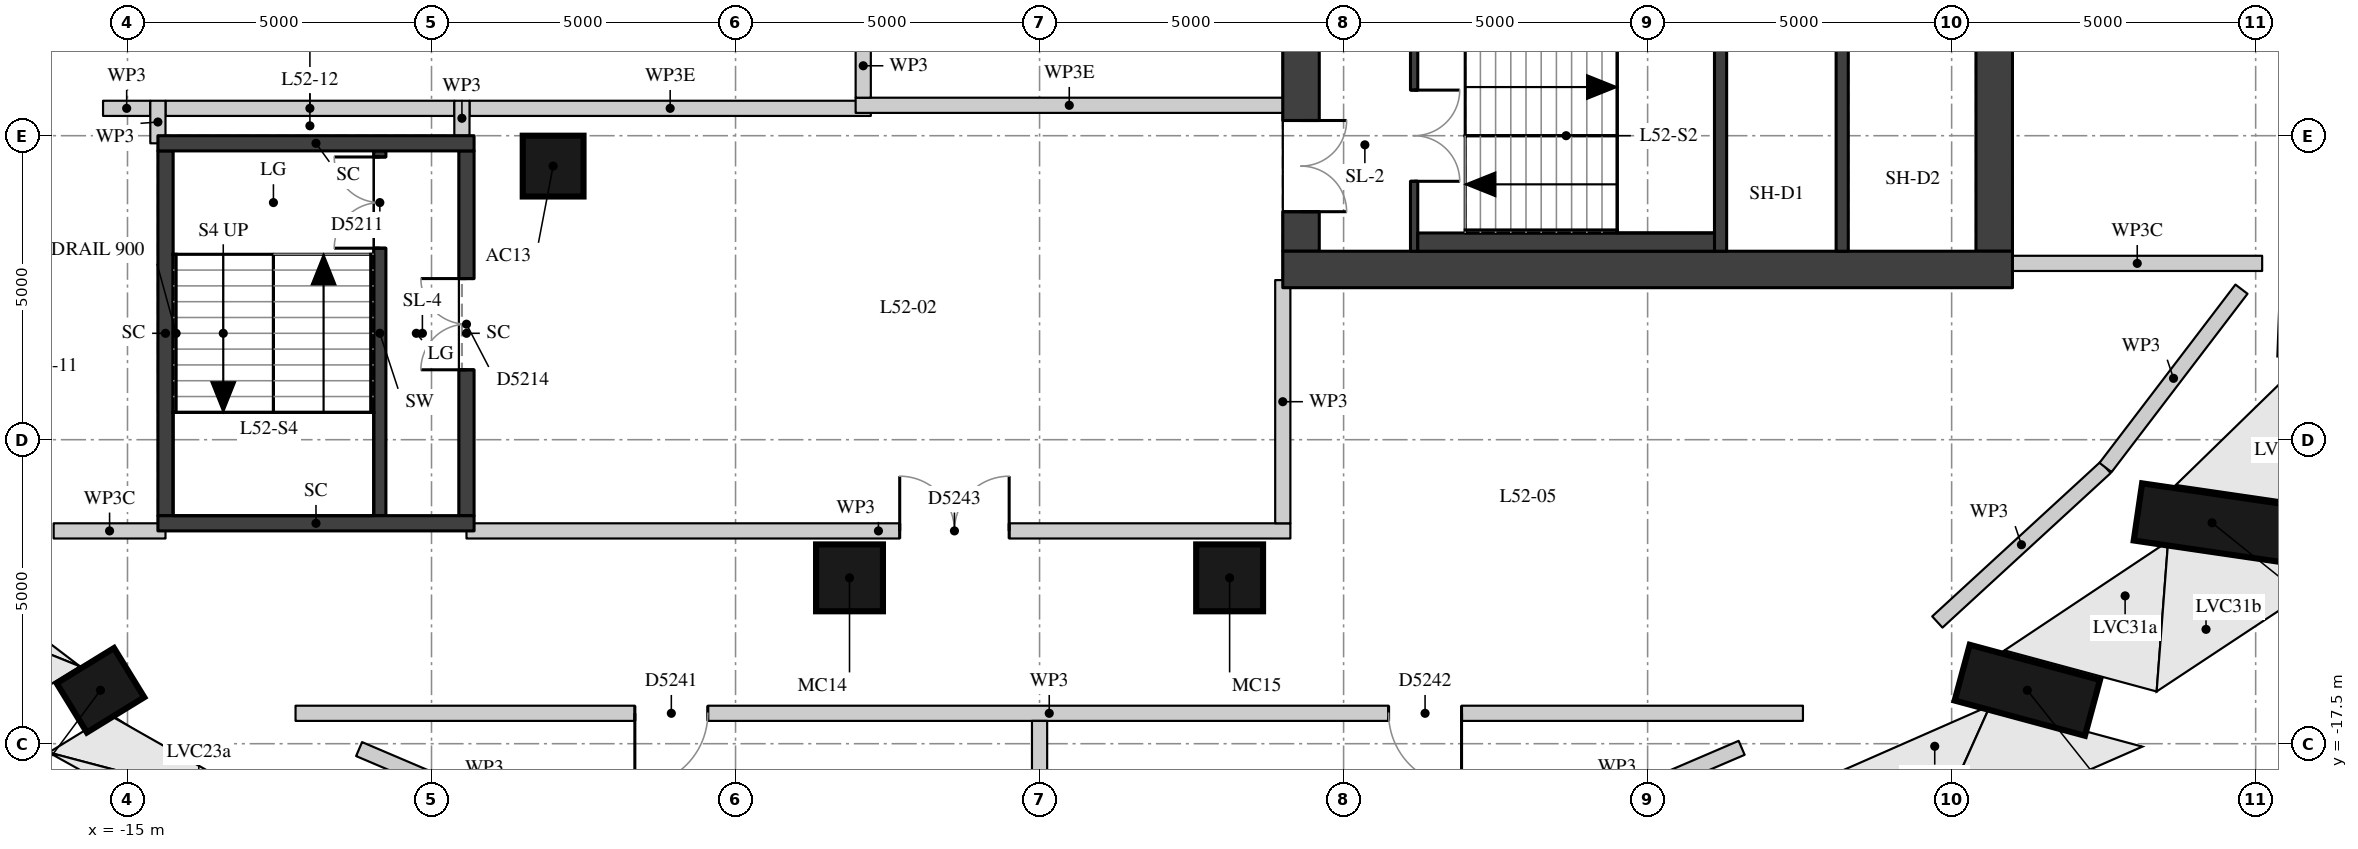
"""IFC4 building model, lengths in metres.
Left out: names, types, materials, properties, quantities, classifications, styles, units other than length and angle.
Written with IfcOpenShell. Run it as: python <this file> out.ifc"""

import sys

from ifc_helpers import new_model, si_unit, direction, frame, frame_2d, origin, origin_2d, place, context, subcontext, project, spatial, rectangle, extrude, element, fill, save


model = new_model("IFC4")
c1 = context("Model", 3, precision=1e-05, world=origin(), true_north=direction((0.0, 1.0)))
c2 = subcontext(c1, "Body", "Model", "MODEL_VIEW")
j1 = project(units=[si_unit("LENGTHUNIT", "METRE"), si_unit("PLANEANGLEUNIT", "RADIAN")], contexts=[c1])
p1 = place(None, origin())
s1 = spatial("IfcSite", under=j1, at=p1, CompositionType="ELEMENT")
p2 = place(p1, origin())
s2 = spatial("IfcBuilding", under=s1, at=p2, CompositionType="ELEMENT")
p3 = place(p2, frame((0.0, 0.0, 184.7)))
s3 = spatial("IfcBuildingStorey", under=s2, at=p3, CompositionType="ELEMENT", Elevation=184.7)
p4 = place(p3, frame((-14.973, -16.332, 0.195), z_axis=(-0.221461411378, -0.136054511212, 0.965631406516), x_axis=(0.822768251203, 0.505466535056, 0.259915345355)))
e1 = element("IfcColumn", 1, at=p4, inside=s3, PredefinedType="COLUMN", context=c2, shape_type="SweptSolid", body=[
    extrude(rectangle(XDim=1.5, YDim=0.95, at=origin_2d()), origin(), (0.0, 0.0, 1.0), 4.256),
])
p5 = place(p3, frame((-11.625, -18.476, 0.17), z_axis=(-0.140500038504, -0.177654239085, 0.974011658306), x_axis=(0.604194068875, 0.763968741279, 0.226497879647)))
e2 = element("IfcColumn", 2, at=p5, inside=s3, PredefinedType="COLUMN", context=c2, shape_type="SweptSolid", body=[
    extrude(rectangle(XDim=1.5, YDim=0.95, at=origin_2d()), origin(), (0.0, 0.0, 1.0), 4.271),
])
p6 = place(p3, frame((11.825, -18.476, 0.342), z_axis=(0.419835312824, -0.17697655666, 0.890178413858), x_axis=(-0.820277441268, 0.345778148306, 0.455612106403)))
e3 = element("IfcColumn", 3, at=p6, inside=s3, PredefinedType="COLUMN", context=c2, shape_type="SweptSolid", body=[
    extrude(rectangle(XDim=1.5, YDim=0.95, at=origin_2d()), origin(), (0.0, 0.0, 1.0), 4.288),
])
p7 = place(p3, frame((15.173, -16.332, 0.383), z_axis=(0.493348917889, -0.133328430356, 0.859552427067), x_axis=(-0.829784308789, 0.224250698467, 0.511047576184)))
e4 = element("IfcColumn", 4, at=p7, inside=s3, PredefinedType="COLUMN", context=c2, shape_type="SweptSolid", body=[
    extrude(rectangle(XDim=1.5, YDim=0.95, at=origin_2d()), origin(), (0.0, 0.0, 1.0), 4.344),
])
p8 = place(p3, frame((18.064, -13.688, 0.419), z_axis=(0.552371010599, -0.080908969614, 0.829662585203), x_axis=(-0.820903020973, 0.120242402852, 0.558265165234)))
e5 = element("IfcColumn", 5, at=p8, inside=s3, PredefinedType="COLUMN", context=c2, shape_type="SweptSolid", body=[
    extrude(rectangle(XDim=1.5, YDim=0.95, at=origin_2d()), origin(), (0.0, 0.0, 1.0), 4.415),
])
p9 = place(p3, frame((20.408, -10.625, 0.448), z_axis=(0.596244983469, -0.022282421222, 0.802493248191), x_axis=(-0.801933449266, 0.029969256604, 0.596661199181)))
e6 = element("IfcColumn", 6, at=p9, inside=s3, PredefinedType="COLUMN", context=c2, shape_type="SweptSolid", body=[
    extrude(rectangle(XDim=1.5, YDim=0.95, at=origin_2d()), origin(), (0.0, 0.0, 1.0), 4.492),
])
p10 = place(p3, frame((-8.0, -8.0, 0.0), z_axis=(0.0, 0.0, 1.0), x_axis=(1.0, 0.0, 0.0)))
e7 = element("IfcColumn", 7, at=p10, inside=s3, PredefinedType="COLUMN", context=c2, shape_type="SweptSolid", body=[
    extrude(rectangle(XDim=1.0, YDim=1.0, at=origin_2d()), origin(), (0.0, 0.0, 1.0), 4.5),
])
for number, where, z_axis, x_axis in (
    (8, (-3.126, -14.772, 0.0), (0.0, 0.0, 1.0), (1.0, 0.0, 0.0)),
    (9, (3.126, -14.772, 0.0), (0.0, 0.0, 1.0), (1.0, 0.0, 0.0)),
):
    element("IfcColumn", number, at=place(p3, frame(where, z_axis=z_axis, x_axis=x_axis)), inside=s3, PredefinedType="COLUMN", context=c2, shape_type="SweptSolid", body=[
        extrude(rectangle(XDim=1.1, YDim=1.1, at=origin_2d()), origin(), (0.0, 0.0, 1.0), 4.5),
    ])
p11 = place(p3, frame((4.3, -9.4, 0.0), z_axis=(0.0, 0.0, 1.0), x_axis=(0.0, 1.0, 0.0)))
e10 = element("IfcWall", 10, at=p11, inside=s3, PredefinedType="SHEAR", context=c2, shape_type="SweptSolid", body=[
    extrude(rectangle(XDim=18.8, YDim=0.6, at=frame_2d((9.4, 0.0))), origin(), (0.0, 0.0, 1.0), 4.22),
])
p12 = place(p11, frame((0.65, 0.0, 0.0)))
e11 = element("IfcOpeningElement", 11, at=p12, cuts=e10, PredefinedType="OPENING", context=c2, shape_type="SweptSolid", body=[
    extrude(rectangle(XDim=1.5, YDim=2.1, at=frame_2d((0.75, 1.05))), frame((0.0, 0.31, 0.0), z_axis=(0.0, -1.0, 0.0), x_axis=(1.0, 0.0, 0.0)), (0.0, 0.0, 1.0), 0.62),
])
p13 = place(p11, frame((3.75, 0.0, 0.0)))
e12 = element("IfcOpeningElement", 12, at=p13, cuts=e10, PredefinedType="OPENING", context=c2, shape_type="SweptSolid", body=[
    extrude(rectangle(XDim=1.8, YDim=2.1, at=frame_2d((0.9, 1.05))), frame((0.0, 0.31, 0.0), z_axis=(0.0, -1.0, 0.0), x_axis=(1.0, 0.0, 0.0)), (0.0, 0.0, 1.0), 0.62),
])
p14 = place(p11, frame((6.25, 0.0, 0.0)))
e13 = element("IfcOpeningElement", 13, at=p14, cuts=e10, PredefinedType="OPENING", context=c2, shape_type="SweptSolid", body=[
    extrude(rectangle(XDim=1.1, YDim=2.1, at=frame_2d((0.55, 1.05))), frame((0.0, 0.31, 0.0), z_axis=(0.0, -1.0, 0.0), x_axis=(1.0, 0.0, 0.0)), (0.0, 0.0, 1.0), 0.62),
])
p15 = place(p11, frame((8.9, 0.0, 0.0)))
e14 = element("IfcOpeningElement", 14, at=p15, cuts=e10, PredefinedType="OPENING", context=c2, shape_type="SweptSolid", body=[
    extrude(rectangle(XDim=1.0, YDim=2.1, at=frame_2d((0.5, 1.05))), frame((0.0, 0.31, 0.0), z_axis=(0.0, -1.0, 0.0), x_axis=(1.0, 0.0, 0.0)), (0.0, 0.0, 1.0), 0.62),
])
p16 = place(p11, frame((11.45, 0.0, 0.0)))
e15 = element("IfcOpeningElement", 15, at=p16, cuts=e10, PredefinedType="OPENING", context=c2, shape_type="SweptSolid", body=[
    extrude(rectangle(XDim=1.1, YDim=2.1, at=frame_2d((0.55, 1.05))), frame((0.0, 0.31, 0.0), z_axis=(0.0, -1.0, 0.0), x_axis=(1.0, 0.0, 0.0)), (0.0, 0.0, 1.0), 0.62),
])
p17 = place(p11, frame((13.25, 0.0, 0.0)))
e16 = element("IfcOpeningElement", 16, at=p17, cuts=e10, PredefinedType="OPENING", context=c2, shape_type="SweptSolid", body=[
    extrude(rectangle(XDim=1.8, YDim=2.1, at=frame_2d((0.9, 1.05))), frame((0.0, 0.31, 0.0), z_axis=(0.0, -1.0, 0.0), x_axis=(1.0, 0.0, 0.0)), (0.0, 0.0, 1.0), 0.62),
])
p18 = place(p11, frame((16.65, 0.0, 0.0)))
e17 = element("IfcOpeningElement", 17, at=p18, cuts=e10, PredefinedType="OPENING", context=c2, shape_type="SweptSolid", body=[
    extrude(rectangle(XDim=1.5, YDim=2.1, at=frame_2d((0.75, 1.05))), frame((0.0, 0.31, 0.0), z_axis=(0.0, -1.0, 0.0), x_axis=(1.0, 0.0, 0.0)), (0.0, 0.0, 1.0), 0.62),
])
p19 = place(p3, frame((15.7, -9.4, 0.0), z_axis=(0.0, 0.0, 1.0), x_axis=(0.0, 1.0, 0.0)))
e18 = element("IfcWall", 18, at=p19, inside=s3, PredefinedType="SHEAR", context=c2, shape_type="SweptSolid", body=[
    extrude(rectangle(XDim=18.8, YDim=0.6, at=frame_2d((9.4, 0.0))), origin(), (0.0, 0.0, 1.0), 4.22),
])
p20 = place(p3, frame((4.0, -9.7, 0.0), z_axis=(0.0, 0.0, 1.0), x_axis=(1.0, 0.0, 0.0)))
e19 = element("IfcWall", 19, at=p20, inside=s3, PredefinedType="SHEAR", context=c2, shape_type="SweptSolid", body=[
    extrude(rectangle(XDim=12.0, YDim=0.6, at=frame_2d((6.0, 0.0))), origin(), (0.0, 0.0, 1.0), 4.22),
])
for number, where, z_axis, x_axis in (
    (20, (11.2, -9.4, 0.0), (0.0, 0.0, 1.0), (0.0, 1.0, 0.0)),
    (21, (13.2, -9.4, 0.0), (0.0, 0.0, 1.0), (0.0, 1.0, 0.0)),
):
    element("IfcWall", number, at=place(p3, frame(where, z_axis=z_axis, x_axis=x_axis)), inside=s3, PredefinedType="SHEAR", context=c2, shape_type="SweptSolid", body=[
        extrude(rectangle(XDim=3.5, YDim=0.2, at=frame_2d((1.75, 0.0))), origin(), (0.0, 0.0, 1.0), 4.22),
    ])
p21 = place(p3, frame((6.16, -9.4, 0.0), z_axis=(0.0, 0.0, 1.0), x_axis=(0.0, 1.0, 0.0)))
e22 = element("IfcWall", 22, at=p21, inside=s3, PredefinedType="SHEAR", context=c2, shape_type="SweptSolid", body=[
    extrude(rectangle(XDim=3.5, YDim=0.12, at=frame_2d((1.75, 0.0))), origin(), (0.0, 0.0, 1.0), 4.22),
])
p22 = place(p21, frame((1.15, 0.0, 0.0)))
e23 = element("IfcOpeningElement", 23, at=p22, cuts=e22, PredefinedType="OPENING", context=c2, shape_type="SweptSolid", body=[
    extrude(rectangle(XDim=1.5, YDim=2.1, at=frame_2d((0.75, 1.05))), frame((0.0, 0.07, 0.0), z_axis=(0.0, -1.0, 0.0), x_axis=(1.0, 0.0, 0.0)), (0.0, 0.0, 1.0), 0.14),
])
p23 = place(p3, frame((-10.85, -13.75, 0.0), z_axis=(0.0, 0.0, 1.0), x_axis=(0.0, 1.0, 0.0)))
e24 = element("IfcWall", 24, at=p23, inside=s3, PredefinedType="SHEAR", context=c2, shape_type="SweptSolid", body=[
    extrude(rectangle(XDim=6.0, YDim=0.2, at=frame_2d((3.0, 0.0))), origin(), (0.0, 0.0, 1.0), 4.22),
])
p24 = place(p23, frame((4.4, 0.0, 0.0)))
e25 = element("IfcOpeningElement", 25, at=p24, cuts=e24, PredefinedType="OPENING", context=c2, shape_type="SweptSolid", body=[
    extrude(rectangle(XDim=1.5, YDim=2.1, at=frame_2d((0.75, 1.05))), frame((0.0, 0.11, 0.0), z_axis=(0.0, -1.0, 0.0), x_axis=(1.0, 0.0, 0.0)), (0.0, 0.0, 1.0), 0.22),
])
p25 = place(p3, frame((6.22, -9.25, 0.0), z_axis=(0.0, 0.0, 1.0), x_axis=(1.0, 0.0, 0.0)))
e26 = element("IfcWall", 26, at=p25, inside=s3, PredefinedType="PARTITIONING", context=c2, shape_type="SweptSolid", body=[
    extrude(rectangle(XDim=4.88, YDim=0.3, at=frame_2d((2.44, 0.0))), origin(), (0.0, 0.0, 1.0), 4.22),
])
p26 = place(p3, frame((-14.375, -13.75, -0.45), z_axis=(0.0, 0.0, 1.0), x_axis=(0.0, 1.0, 0.0)))
e27 = element("IfcWall", 27, at=p26, inside=s3, PredefinedType="SHEAR", context=c2, shape_type="SweptSolid", body=[
    extrude(rectangle(XDim=6.0, YDim=0.25, at=frame_2d((3.0, 0.0))), origin(), (0.0, 0.0, 1.0), 4.67),
])
p27 = place(p3, frame((-9.425, -13.75, -0.45), z_axis=(0.0, 0.0, 1.0), x_axis=(0.0, 1.0, 0.0)))
e28 = element("IfcWall", 28, at=p27, inside=s3, PredefinedType="SHEAR", context=c2, shape_type="SweptSolid", body=[
    extrude(rectangle(XDim=6.0, YDim=0.25, at=frame_2d((3.0, 0.0))), origin(), (0.0, 0.0, 1.0), 4.67),
])
p28 = place(p27, frame((2.4, 0.0, 0.45)))
e29 = element("IfcOpeningElement", 29, at=p28, cuts=e28, PredefinedType="OPENING", context=c2, shape_type="SweptSolid", body=[
    extrude(rectangle(XDim=1.5, YDim=2.1, at=frame_2d((0.75, 1.05))), frame((0.0, 0.135, 0.0), z_axis=(0.0, -1.0, 0.0), x_axis=(1.0, 0.0, 0.0)), (0.0, 0.0, 1.0), 0.27),
])
for number, where, z_axis, x_axis in (
    (30, (-14.5, -7.625, -0.45), (0.0, 0.0, 1.0), (1.0, 0.0, 0.0)),
    (31, (-14.5, -13.875, -0.45), (0.0, 0.0, 1.0), (1.0, 0.0, 0.0)),
):
    element("IfcWall", number, at=place(p3, frame(where, z_axis=z_axis, x_axis=x_axis)), inside=s3, PredefinedType="SHEAR", context=c2, shape_type="SweptSolid", body=[
        extrude(rectangle(XDim=5.2, YDim=0.25, at=frame_2d((2.6, 0.0))), origin(), (0.0, 0.0, 1.0), 4.67),
    ])
p29 = place(p3, frame((14.765, -15.498, 0.0), z_axis=(0.0, 0.0, 1.0), x_axis=(0.736371276914, 0.676577669256, 0.0)))
e32 = element("IfcWall", 32, at=p29, inside=s3, PredefinedType="PARTITIONING", context=c2, shape_type="SweptSolid", body=[
    extrude(rectangle(XDim=3.756, YDim=0.25, at=frame_2d((1.878, 0.0))), origin(), (0.0, 0.0, 1.0), 4.22),
])
p30 = place(p3, frame((17.531, -12.957, 0.0), z_axis=(0.0, 0.0, 1.0), x_axis=(0.606326433884, 0.795215854704, 0.0)))
e33 = element("IfcWall", 33, at=p30, inside=s3, PredefinedType="PARTITIONING", context=c2, shape_type="SweptSolid", body=[
    extrude(rectangle(XDim=3.688, YDim=0.25, at=frame_2d((1.844, 0.0))), origin(), (0.0, 0.0, 1.0), 4.22),
])
p31 = place(p3, frame((-11.191, -17.588, 0.0), z_axis=(0.0, 0.0, 1.0), x_axis=(0.92013404358, -0.391603551881, 0.0)))
e34 = element("IfcWall", 34, at=p31, inside=s3, PredefinedType="PARTITIONING", context=c2, shape_type="SweptSolid", body=[
    extrude(rectangle(XDim=3.908, YDim=0.25, at=frame_2d((1.954, 0.0))), origin(), (0.0, 0.0, 1.0), 4.22),
])
p32 = place(p3, frame((7.973, -19.1, 0.0), z_axis=(0.0, 0.0, 1.0), x_axis=(0.919076811857, 0.394078436238, 0.0)))
e35 = element("IfcWall", 35, at=p32, inside=s3, PredefinedType="PARTITIONING", context=c2, shape_type="SweptSolid", body=[
    extrude(rectangle(XDim=3.888, YDim=0.25, at=frame_2d((1.944, 0.0))), origin(), (0.0, 0.0, 1.0), 4.22),
])
p33 = place(p3, frame((-12.236, -17.0, 0.0), z_axis=(0.0, 0.0, 1.0), x_axis=(1.0, 0.0, 0.0)))
e36 = element("IfcWall", 36, at=p33, inside=s3, PredefinedType="PARTITIONING", context=c2, shape_type="SweptSolid", body=[
    extrude(rectangle(XDim=24.791, YDim=0.25, at=frame_2d((12.396, 0.0))), origin(), (0.0, 0.0, 1.0), 4.22),
])
p34 = place(p33, frame((5.58, 0.0, 0.0)))
e37 = element("IfcOpeningElement", 37, at=p34, cuts=e36, PredefinedType="OPENING", context=c2, shape_type="SweptSolid", body=[
    extrude(rectangle(XDim=1.2, YDim=2.1, at=frame_2d((0.6, 1.05))), frame((0.0, 0.135, 0.0), z_axis=(0.0, -1.0, 0.0), x_axis=(1.0, 0.0, 0.0)), (0.0, 0.0, 1.0), 0.27),
])
p35 = place(p33, frame((17.976, 0.0, 0.0)))
e38 = element("IfcOpeningElement", 38, at=p35, cuts=e36, PredefinedType="OPENING", context=c2, shape_type="SweptSolid", body=[
    extrude(rectangle(XDim=1.2, YDim=2.1, at=frame_2d((0.6, 1.05))), frame((0.0, 0.135, 0.0), z_axis=(0.0, -1.0, 0.0), x_axis=(1.0, 0.0, 0.0)), (0.0, 0.0, 1.0), 0.27),
])
p36 = place(p3, frame((-16.214, -14.0, 0.0), z_axis=(0.0, 0.0, 1.0), x_axis=(1.0, 0.0, 0.0)))
e39 = element("IfcWall", 39, at=p36, inside=s3, PredefinedType="PARTITIONING", context=c2, shape_type="SweptSolid", body=[
    extrude(rectangle(XDim=1.839, YDim=0.25, at=frame_2d((0.92, 0.0))), origin(), (0.0, 0.0, 1.0), 3.77),
])
p37 = place(p3, frame((-9.425, -14.0, 0.0), z_axis=(0.0, 0.0, 1.0), x_axis=(1.0, 0.0, 0.0)))
e40 = element("IfcWall", 40, at=p37, inside=s3, PredefinedType="PARTITIONING", context=c2, shape_type="SweptSolid", body=[
    extrude(rectangle(XDim=13.55, YDim=0.25, at=frame_2d((6.775, 0.0))), origin(), (0.0, 0.0, 1.0), 4.22),
])
p38 = place(p37, frame((7.125, 0.0, 0.0)))
e41 = element("IfcOpeningElement", 41, at=p38, cuts=e40, PredefinedType="OPENING", context=c2, shape_type="SweptSolid", body=[
    extrude(rectangle(XDim=1.8, YDim=2.1, at=frame_2d((0.9, 1.05))), frame((0.0, 0.135, 0.0), z_axis=(0.0, -1.0, 0.0), x_axis=(1.0, 0.0, 0.0)), (0.0, 0.0, 1.0), 0.27),
])
p39 = place(p3, frame((15.998, -9.6, 0.0), z_axis=(0.0, 0.0, 1.0), x_axis=(1.0, 0.0, 0.0)))
e42 = element("IfcWall", 42, at=p39, inside=s3, PredefinedType="PARTITIONING", context=c2, shape_type="SweptSolid", body=[
    extrude(rectangle(XDim=4.109, YDim=0.25, at=frame_2d((2.054, 0.0))), origin(), (0.0, 0.0, 1.0), 3.77),
])
p40 = place(p3, frame((-15.402, -7.05, 0.0), z_axis=(0.0, 0.0, 1.0), x_axis=(1.0, 0.0, 0.0)))
e43 = element("IfcWall", 43, at=p40, inside=s3, PredefinedType="PARTITIONING", context=c2, shape_type="SweptSolid", body=[
    extrude(rectangle(XDim=0.777, YDim=0.25, at=frame_2d((0.389, 0.0))), origin(), (0.0, 0.0, 1.0), 4.22),
])
p41 = place(p3, frame((-14.375, -7.05, 0.0), z_axis=(0.0, 0.0, 1.0), x_axis=(1.0, 0.0, 0.0)))
e44 = element("IfcWall", 44, at=p41, inside=s3, PredefinedType="PARTITIONING", context=c2, shape_type="SweptSolid", body=[
    extrude(rectangle(XDim=4.75, YDim=0.25, at=frame_2d((2.375, 0.0))), origin(), (0.0, 0.0, 1.0), 4.22),
])
p42 = place(p3, frame((-9.375, -7.05, 0.0), z_axis=(0.0, 0.0, 1.0), x_axis=(1.0, 0.0, 0.0)))
e45 = element("IfcWall", 45, at=p42, inside=s3, PredefinedType="PARTITIONING", context=c2, shape_type="SweptSolid", body=[
    extrude(rectangle(XDim=6.6, YDim=0.25, at=frame_2d((3.3, 0.0))), origin(), (0.0, 0.0, 1.0), 3.67),
])
p43 = place(p3, frame((-3.025, -7.0, 0.0), z_axis=(0.0, 0.0, 1.0), x_axis=(1.0, 0.0, 0.0)))
e46 = element("IfcWall", 46, at=p43, inside=s3, PredefinedType="PARTITIONING", context=c2, shape_type="SweptSolid", body=[
    extrude(rectangle(XDim=7.027, YDim=0.25, at=frame_2d((3.513, 0.0))), origin(), (0.0, 0.0, 1.0), 3.67),
])
p44 = place(p3, frame((-14.5, -7.625, 0.0), z_axis=(0.0, 0.0, 1.0), x_axis=(0.0, 1.0, 0.0)))
e47 = element("IfcWall", 47, at=p44, inside=s3, PredefinedType="PARTITIONING", context=c2, shape_type="SweptSolid", body=[
    extrude(rectangle(XDim=0.7, YDim=0.25, at=frame_2d((0.35, 0.0))), origin(), (0.0, 0.0, 1.0), 4.22),
])
p45 = place(p3, frame((-9.5, -7.502, 0.0), z_axis=(0.0, 0.0, 1.0), x_axis=(0.0, 1.0, 0.0)))
e48 = element("IfcWall", 48, at=p45, inside=s3, PredefinedType="PARTITIONING", context=c2, shape_type="SweptSolid", body=[
    extrude(rectangle(XDim=0.577, YDim=0.25, at=frame_2d((0.289, 0.0))), origin(), (0.0, 0.0, 1.0), 4.22),
])
p46 = place(p3, frame((-2.9, -6.875, 0.0), z_axis=(0.0, 0.0, 1.0), x_axis=(0.0, 1.0, 0.0)))
e49 = element("IfcWall", 49, at=p46, inside=s3, PredefinedType="PARTITIONING", context=c2, shape_type="SweptSolid", body=[
    extrude(rectangle(XDim=1.05, YDim=0.25, at=frame_2d((0.525, 0.0))), origin(), (0.0, 0.0, 1.0), 4.22),
])
p47 = place(p3, frame((0.0, -20.476, 0.0), z_axis=(0.0, 0.0, 1.0), x_axis=(0.0, 1.0, 0.0)))
e50 = element("IfcWall", 50, at=p47, inside=s3, PredefinedType="PARTITIONING", context=c2, shape_type="SweptSolid", body=[
    extrude(rectangle(XDim=3.351, YDim=0.25, at=frame_2d((1.675, 0.0))), origin(), (0.0, 0.0, 1.0), 3.77),
])
p48 = place(p3, frame((4.0, -13.875, 0.0), z_axis=(0.0, 0.0, 1.0), x_axis=(0.0, 1.0, 0.0)))
e51 = element("IfcWall", 51, at=p48, inside=s3, PredefinedType="PARTITIONING", context=c2, shape_type="SweptSolid", body=[
    extrude(rectangle(XDim=4.0, YDim=0.25, at=frame_2d((2.0, 0.0))), origin(), (0.0, 0.0, 1.0), 4.22),
])
p49 = place(p12, origin())
e52 = element("IfcDoor", 52, at=p49, inside=s3, OperationType="DOUBLE_DOOR_SINGLE_SWING", PredefinedType="DOOR", context=c2, shape_type="SweptSolid", body=[
    extrude(rectangle(XDim=1.5, YDim=2.1, at=frame_2d((0.75, 1.05))), frame((0.0, 0.025, 0.0), z_axis=(0.0, -1.0, 0.0), x_axis=(1.0, 0.0, 0.0)), (0.0, 0.0, 1.0), 0.05),
])
fill(e11, e52)
p50 = place(p22, origin())
e53 = element("IfcDoor", 53, at=p50, inside=s3, OperationType="DOUBLE_DOOR_SINGLE_SWING", PredefinedType="DOOR", context=c2, shape_type="SweptSolid", body=[
    extrude(rectangle(XDim=1.5, YDim=2.1, at=frame_2d((0.75, 1.05))), frame((0.0, 0.025, 0.0), z_axis=(0.0, -1.0, 0.0), x_axis=(1.0, 0.0, 0.0)), (0.0, 0.0, 1.0), 0.05),
])
fill(e23, e53)
p51 = place(p24, origin())
e54 = element("IfcDoor", 54, at=p51, inside=s3, OperationType="DOUBLE_DOOR_SINGLE_SWING", PredefinedType="DOOR", context=c2, shape_type="SweptSolid", body=[
    extrude(rectangle(XDim=1.5, YDim=2.1, at=frame_2d((0.75, 1.05))), frame((0.0, 0.025, 0.0), z_axis=(0.0, -1.0, 0.0), x_axis=(1.0, 0.0, 0.0)), (0.0, 0.0, 1.0), 0.05),
])
fill(e25, e54)
p52 = place(p28, origin())
e55 = element("IfcDoor", 55, at=p52, inside=s3, OperationType="DOUBLE_DOOR_SINGLE_SWING", PredefinedType="DOOR", context=c2, shape_type="SweptSolid", body=[
    extrude(rectangle(XDim=1.5, YDim=2.1, at=frame_2d((0.75, 1.05))), frame((0.0, 0.025, 0.0), z_axis=(0.0, -1.0, 0.0), x_axis=(1.0, 0.0, 0.0)), (0.0, 0.0, 1.0), 0.05),
])
fill(e29, e55)
p53 = place(p34, origin())
e56 = element("IfcDoor", 56, at=p53, inside=s3, OperationType="SINGLE_SWING_RIGHT", PredefinedType="DOOR", context=c2, shape_type="SweptSolid", body=[
    extrude(rectangle(XDim=1.2, YDim=2.1, at=frame_2d((0.6, 1.05))), frame((0.0, 0.025, 0.0), z_axis=(0.0, -1.0, 0.0), x_axis=(1.0, 0.0, 0.0)), (0.0, 0.0, 1.0), 0.05),
])
fill(e37, e56)
p54 = place(p35, origin())
e57 = element("IfcDoor", 57, at=p54, inside=s3, OperationType="SINGLE_SWING_LEFT", PredefinedType="DOOR", context=c2, shape_type="SweptSolid", body=[
    extrude(rectangle(XDim=1.2, YDim=2.1, at=frame_2d((0.6, 1.05))), frame((0.0, 0.025, 0.0), z_axis=(0.0, -1.0, 0.0), x_axis=(1.0, 0.0, 0.0)), (0.0, 0.0, 1.0), 0.05),
])
fill(e38, e57)
p55 = place(p38, origin())
e58 = element("IfcDoor", 58, at=p55, inside=s3, OperationType="DOUBLE_DOOR_SINGLE_SWING", PredefinedType="DOOR", context=c2, shape_type="SweptSolid", body=[
    extrude(rectangle(XDim=1.8, YDim=2.1, at=frame_2d((0.9, 1.05))), frame((0.0, 0.025, 0.0), z_axis=(0.0, -1.0, 0.0), x_axis=(1.0, 0.0, 0.0)), (0.0, 0.0, 1.0), 0.05),
])
fill(e41, e58)
save(model, sys.argv[1])
